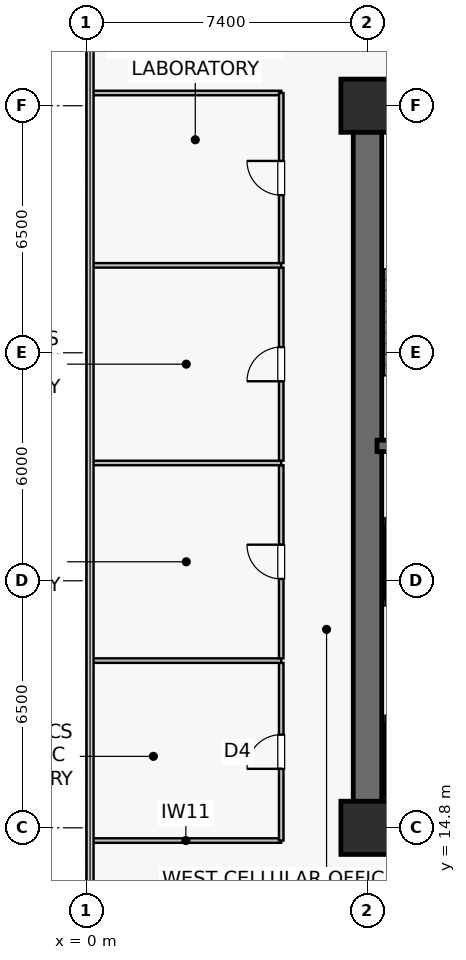
"""IFC4 building model, lengths in metres.
Left out: names, types, materials, properties, quantities, classifications, styles, units other than length and angle.
Written with IfcOpenShell. Run it as: python <this file> out.ifc"""

import sys

from ifc_helpers import new_model, si_unit, direction, frame, frame_2d, origin, origin_2d, place, context, subcontext, project, spatial, rectangle, extrude, source, transform, mapped, element, fill, save


model = new_model("IFC4")
c1 = context("Model", 3, precision=1e-05, world=origin(), true_north=direction((0.0, 1.0)))
c2 = subcontext(c1, "Body", "Model", "MODEL_VIEW")
j1 = project(units=[si_unit("LENGTHUNIT", "METRE"), si_unit("PLANEANGLEUNIT", "RADIAN")], contexts=[c1])
p1 = place(None, origin())
s1 = spatial("IfcSite", under=j1, at=p1, CompositionType="ELEMENT")
p2 = place(p1, origin())
s2 = spatial("IfcBuilding", under=s1, at=p2, CompositionType="ELEMENT")
p3 = place(p2, frame((0.0, 0.0, 49.8)))
s3 = spatial("IfcBuildingStorey", under=s2, at=p3, CompositionType="ELEMENT", Elevation=49.8)
p4 = place(p3, frame((7.025, 14.8, 0.0), z_axis=(0.0, 0.0, 1.0), x_axis=(1.0, 0.0, 0.0)))
e1 = element("IfcWall", 1, at=p4, inside=s3, PredefinedType="SHEAR", context=c2, shape_type="SweptSolid", body=[
    extrude(rectangle(XDim=15.55, YDim=0.75, at=frame_2d((7.775, 0.0))), origin(), (0.0, 0.0, 1.0), 3.78),
])
p5 = place(p3, frame((7.025, 33.8, 0.0), z_axis=(0.0, 0.0, 1.0), x_axis=(1.0, 0.0, 0.0)))
e2 = element("IfcWall", 2, at=p5, inside=s3, PredefinedType="SHEAR", context=c2, shape_type="SweptSolid", body=[
    extrude(rectangle(XDim=15.55, YDim=0.75, at=frame_2d((7.775, 0.0))), origin(), (0.0, 0.0, 1.0), 3.78),
])
p6 = place(p5, frame((5.3, 0.0, 0.0)))
e3 = element("IfcOpeningElement", 3, at=p6, cuts=e2, PredefinedType="OPENING", context=c2, shape_type="SweptSolid", body=[
    extrude(rectangle(XDim=0.95, YDim=2.15, at=frame_2d((0.475, 1.075))), frame((0.0, 0.385, 0.0), z_axis=(0.0, -1.0, 0.0), x_axis=(1.0, 0.0, 0.0)), (0.0, 0.0, 1.0), 0.77),
])
p7 = place(p5, frame((7.815, 0.0, 0.0)))
e4 = element("IfcOpeningElement", 4, at=p7, cuts=e2, PredefinedType="OPENING", context=c2, shape_type="SweptSolid", body=[
    extrude(rectangle(XDim=0.95, YDim=2.15, at=frame_2d((0.475, 1.075))), frame((0.0, 0.385, 0.0), z_axis=(0.0, -1.0, 0.0), x_axis=(1.0, 0.0, 0.0)), (0.0, 0.0, 1.0), 0.77),
])
p8 = place(p5, frame((10.365, 0.0, 0.0)))
e5 = element("IfcOpeningElement", 5, at=p8, cuts=e2, PredefinedType="OPENING", context=c2, shape_type="SweptSolid", body=[
    extrude(rectangle(XDim=0.95, YDim=2.15, at=frame_2d((0.475, 1.075))), frame((0.0, 0.385, 0.0), z_axis=(0.0, -1.0, 0.0), x_axis=(1.0, 0.0, 0.0)), (0.0, 0.0, 1.0), 0.77),
])
p9 = place(p5, frame((12.915, 0.0, 0.0)))
e6 = element("IfcOpeningElement", 6, at=p9, cuts=e2, PredefinedType="OPENING", context=c2, shape_type="SweptSolid", body=[
    extrude(rectangle(XDim=0.95, YDim=2.15, at=frame_2d((0.475, 1.075))), frame((0.0, 0.385, 0.0), z_axis=(0.0, -1.0, 0.0), x_axis=(1.0, 0.0, 0.0)), (0.0, 0.0, 1.0), 0.77),
])
p10 = place(p3, frame((7.4, 15.175, 0.0), z_axis=(0.0, 0.0, 1.0), x_axis=(0.0, 1.0, 0.0)))
e7 = element("IfcWall", 7, at=p10, inside=s3, PredefinedType="SHEAR", context=c2, shape_type="SweptSolid", body=[
    extrude(rectangle(XDim=18.25, YDim=0.75, at=frame_2d((9.125, 0.0))), origin(), (0.0, 0.0, 1.0), 3.78),
])
p11 = place(p3, frame((7.65, 24.85, 0.0), z_axis=(0.0, 0.0, 1.0), x_axis=(1.0, 0.0, 0.0)))
e8 = element("IfcWall", 8, at=p11, inside=s3, PredefinedType="SHEAR", context=c2, shape_type="SweptSolid", body=[
    extrude(rectangle(XDim=3.8, YDim=0.3, at=frame_2d((1.9, 0.0))), origin(), (0.0, 0.0, 1.0), 3.78),
])
p12 = place(p3, frame((7.73, 33.4, 0.0), z_axis=(0.0, 0.0, 1.0), x_axis=(1.0, 0.0, 0.0)))
e9 = element("IfcWall", 9, at=p12, inside=s3, PredefinedType="SOLIDWALL", context=c2, shape_type="SweptSolid", body=[
    extrude(rectangle(XDim=3.72, YDim=0.12, at=frame_2d((1.86, 0.0))), origin(), (0.0, 0.0, 1.0), 3.78),
])
m1 = source(origin(), c2, "Body", "SweptSolid", [
    extrude(rectangle(XDim=1.4, YDim=1.4, at=origin_2d()), origin(), (0.0, 0.0, 1.0), 4.1),
])
for number, where, z_axis, x_axis in (
    (10, (7.4, 14.8, 0.0), (0.0, 0.0, 1.0), (1.0, 0.0, 0.0)),
    (11, (7.4, 33.8, 0.0), (0.0, 0.0, 1.0), (1.0, 0.0, 0.0)),
):
    element("IfcColumn", number, at=place(p3, frame(where, z_axis=z_axis, x_axis=x_axis)), inside=s3, PredefinedType="COLUMN", context=c2, shape_type="MappedRepresentation", body=[
        mapped(m1, transform((0.0, 0.0, 0.0), scale=1.0)),
    ])
p13 = place(p3, frame((7.87, 17.65, 0.0), z_axis=(0.0, 0.0, 1.0), x_axis=(1.0, 0.0, 0.0)))
e12 = element("IfcWall", 12, at=p13, inside=s3, PredefinedType="SOLIDWALL", context=c2, shape_type="SweptSolid", body=[
    extrude(rectangle(XDim=2.26, YDim=0.2, at=frame_2d((1.13, 0.0))), origin(), (0.0, 0.0, 1.0), 3.78),
])
p14 = place(p13, frame((0.58, 0.0, 0.0)))
e13 = element("IfcOpeningElement", 13, at=p14, cuts=e12, PredefinedType="OPENING", context=c2, shape_type="SweptSolid", body=[
    extrude(rectangle(XDim=1.1, YDim=2.22, at=frame_2d((0.55, 1.11))), frame((0.0, 0.11, 0.0), z_axis=(0.0, -1.0, 0.0), x_axis=(1.0, 0.0, 0.0)), (0.0, 0.0, 1.0), 0.22),
])
p15 = place(p3, frame((7.87, 15.55, 0.0), z_axis=(0.0, 0.0, 1.0), x_axis=(1.0, 0.0, 0.0)))
e14 = element("IfcWall", 14, at=p15, inside=s3, PredefinedType="SOLIDWALL", context=c2, shape_type="SweptSolid", body=[
    extrude(rectangle(XDim=2.26, YDim=0.2, at=frame_2d((1.13, 0.0))), origin(), (0.0, 0.0, 1.0), 3.78),
])
p16 = place(p3, frame((7.95, 15.65, 0.0), z_axis=(0.0, 0.0, 1.0), x_axis=(0.0, 1.0, 0.0)))
e15 = element("IfcWall", 15, at=p16, inside=s3, PredefinedType="SOLIDWALL", context=c2, shape_type="SweptSolid", body=[
    extrude(rectangle(XDim=1.9, YDim=0.18, at=frame_2d((0.95, 0.0))), origin(), (0.0, 0.0, 1.0), 3.78),
])
for number, where, z_axis, x_axis in (
    (16, (7.87, 20.75, 0.0), (0.0, 0.0, 1.0), (1.0, 0.0, 0.0)),
    (17, (7.87, 22.85, 0.0), (0.0, 0.0, 1.0), (1.0, 0.0, 0.0)),
):
    element("IfcWall", number, at=place(p3, frame(where, z_axis=z_axis, x_axis=x_axis)), inside=s3, PredefinedType="SOLIDWALL", context=c2, shape_type="SweptSolid", body=[
        extrude(rectangle(XDim=2.26, YDim=0.2, at=frame_2d((1.13, 0.0))), origin(), (0.0, 0.0, 1.0), 3.78),
    ])
p17 = place(p3, frame((7.95, 20.85, 0.0), z_axis=(0.0, 0.0, 1.0), x_axis=(0.0, 1.0, 0.0)))
e18 = element("IfcWall", 18, at=p17, inside=s3, PredefinedType="SOLIDWALL", context=c2, shape_type="SweptSolid", body=[
    extrude(rectangle(XDim=1.9, YDim=0.18, at=frame_2d((0.95, 0.0))), origin(), (0.0, 0.0, 1.0), 3.78),
])
for number, where, z_axis, x_axis in (
    (19, (0.11, 14.465, 0.0), (0.0, 0.0, 1.0), (1.0, 0.0, 0.0)),
    (20, (0.11, 34.135, 0.0), (0.0, 0.0, 1.0), (1.0, 0.0, 0.0)),
):
    element("IfcWall", number, at=place(p3, frame(where, z_axis=z_axis, x_axis=x_axis)), inside=s3, PredefinedType="PARTITIONING", context=c2, shape_type="SweptSolid", body=[
        extrude(rectangle(XDim=5.02, YDim=0.12, at=frame_2d((2.51, 0.0))), origin(), (0.0, 0.0, 1.0), 3.78),
    ])
p18 = place(p3, frame((5.13, 14.465, 0.0), z_axis=(0.0, 0.0, 1.0), x_axis=(0.0, 1.0, 0.0)))
e21 = element("IfcWall", 21, at=p18, inside=s3, PredefinedType="PARTITIONING", context=c2, shape_type="SweptSolid", body=[
    extrude(rectangle(XDim=4.675, YDim=0.12, at=frame_2d((2.337, 0.0))), origin(), (0.0, 0.0, 1.0), 3.78),
])
p19 = place(p18, frame((1.887, 0.0, 0.0)))
e22 = element("IfcOpeningElement", 22, at=p19, cuts=e21, PredefinedType="OPENING", context=c2, shape_type="SweptSolid", body=[
    extrude(rectangle(XDim=0.9, YDim=2.1, at=frame_2d((0.45, 1.05))), frame((0.0, 0.07, 0.0), z_axis=(0.0, -1.0, 0.0), x_axis=(1.0, 0.0, 0.0)), (0.0, 0.0, 1.0), 0.14),
])
p20 = place(p3, frame((0.11, 19.2, 0.0), z_axis=(0.0, 0.0, 1.0), x_axis=(1.0, 0.0, 0.0)))
e23 = element("IfcWall", 23, at=p20, inside=s3, PredefinedType="PARTITIONING", context=c2, shape_type="SweptSolid", body=[
    extrude(rectangle(XDim=5.02, YDim=0.12, at=frame_2d((2.51, 0.0))), origin(), (0.0, 0.0, 1.0), 3.78),
])
p21 = place(p3, frame((5.13, 19.26, 0.0), z_axis=(0.0, 0.0, 1.0), x_axis=(0.0, 1.0, 0.0)))
e24 = element("IfcWall", 24, at=p21, inside=s3, PredefinedType="PARTITIONING", context=c2, shape_type="SweptSolid", body=[
    extrude(rectangle(XDim=5.08, YDim=0.12, at=frame_2d((2.54, 0.0))), origin(), (0.0, 0.0, 1.0), 3.78),
])
p22 = place(p21, frame((2.09, 0.0, 0.0)))
e25 = element("IfcOpeningElement", 25, at=p22, cuts=e24, PredefinedType="OPENING", context=c2, shape_type="SweptSolid", body=[
    extrude(rectangle(XDim=0.9, YDim=2.1, at=frame_2d((0.45, 1.05))), frame((0.0, 0.07, 0.0), z_axis=(0.0, -1.0, 0.0), x_axis=(1.0, 0.0, 0.0)), (0.0, 0.0, 1.0), 0.14),
])
p23 = place(p3, frame((0.11, 24.4, 0.0), z_axis=(0.0, 0.0, 1.0), x_axis=(1.0, 0.0, 0.0)))
e26 = element("IfcWall", 26, at=p23, inside=s3, PredefinedType="PARTITIONING", context=c2, shape_type="SweptSolid", body=[
    extrude(rectangle(XDim=5.02, YDim=0.12, at=frame_2d((2.51, 0.0))), origin(), (0.0, 0.0, 1.0), 3.78),
])
p24 = place(p3, frame((5.13, 24.46, 0.0), z_axis=(0.0, 0.0, 1.0), x_axis=(0.0, 1.0, 0.0)))
e27 = element("IfcWall", 27, at=p24, inside=s3, PredefinedType="PARTITIONING", context=c2, shape_type="SweptSolid", body=[
    extrude(rectangle(XDim=5.08, YDim=0.12, at=frame_2d((2.54, 0.0))), origin(), (0.0, 0.0, 1.0), 3.78),
])
p25 = place(p24, frame((2.09, 0.0, 0.0)))
e28 = element("IfcOpeningElement", 28, at=p25, cuts=e27, PredefinedType="OPENING", context=c2, shape_type="SweptSolid", body=[
    extrude(rectangle(XDim=0.9, YDim=2.1, at=frame_2d((0.45, 1.05))), frame((0.0, 0.07, 0.0), z_axis=(0.0, -1.0, 0.0), x_axis=(1.0, 0.0, 0.0)), (0.0, 0.0, 1.0), 0.14),
])
p26 = place(p3, frame((0.11, 29.6, 0.0), z_axis=(0.0, 0.0, 1.0), x_axis=(1.0, 0.0, 0.0)))
e29 = element("IfcWall", 29, at=p26, inside=s3, PredefinedType="PARTITIONING", context=c2, shape_type="SweptSolid", body=[
    extrude(rectangle(XDim=5.02, YDim=0.12, at=frame_2d((2.51, 0.0))), origin(), (0.0, 0.0, 1.0), 3.78),
])
p27 = place(p3, frame((5.13, 29.66, 0.0), z_axis=(0.0, 0.0, 1.0), x_axis=(0.0, 1.0, 0.0)))
e30 = element("IfcWall", 30, at=p27, inside=s3, PredefinedType="PARTITIONING", context=c2, shape_type="SweptSolid", body=[
    extrude(rectangle(XDim=4.475, YDim=0.12, at=frame_2d((2.238, 0.0))), origin(), (0.0, 0.0, 1.0), 3.78),
])
p28 = place(p27, frame((1.788, 0.0, 0.0)))
e31 = element("IfcOpeningElement", 31, at=p28, cuts=e30, PredefinedType="OPENING", context=c2, shape_type="SweptSolid", body=[
    extrude(rectangle(XDim=0.9, YDim=2.1, at=frame_2d((0.45, 1.05))), frame((0.0, 0.07, 0.0), z_axis=(0.0, -1.0, 0.0), x_axis=(1.0, 0.0, 0.0)), (0.0, 0.0, 1.0), 0.14),
])
m2 = source(origin(), c2, "Body", "SweptSolid", [
    extrude(rectangle(XDim=0.9, YDim=2.1, at=frame_2d((0.45, 1.05))), frame((0.0, 0.025, 0.0), z_axis=(0.0, -1.0, 0.0), x_axis=(1.0, 0.0, 0.0)), (0.0, 0.0, 1.0), 0.05),
])
p29 = place(p19, origin())
e32 = element("IfcDoor", 32, at=p29, inside=s3, OperationType="SINGLE_SWING_LEFT", PredefinedType="DOOR", context=c2, shape_type="MappedRepresentation", body=[
    mapped(m2, transform((0.0, 0.0, 0.0), scale=1.0)),
])
fill(e22, e32)
p30 = place(p22, origin())
e33 = element("IfcDoor", 33, at=p30, inside=s3, OperationType="SINGLE_SWING_RIGHT", PredefinedType="DOOR", context=c2, shape_type="MappedRepresentation", body=[
    mapped(m2, transform((0.0, 0.0, 0.0), scale=1.0)),
])
fill(e25, e33)
p31 = place(p25, origin())
e34 = element("IfcDoor", 34, at=p31, inside=s3, OperationType="SINGLE_SWING_LEFT", PredefinedType="DOOR", context=c2, shape_type="MappedRepresentation", body=[
    mapped(m2, transform((0.0, 0.0, 0.0), scale=1.0)),
])
fill(e28, e34)
p32 = place(p28, origin())
e35 = element("IfcDoor", 35, at=p32, inside=s3, OperationType="SINGLE_SWING_RIGHT", PredefinedType="DOOR", context=c2, shape_type="MappedRepresentation", body=[
    mapped(m2, transform((0.0, 0.0, 0.0), scale=1.0)),
])
fill(e31, e35)
save(model, sys.argv[1])
